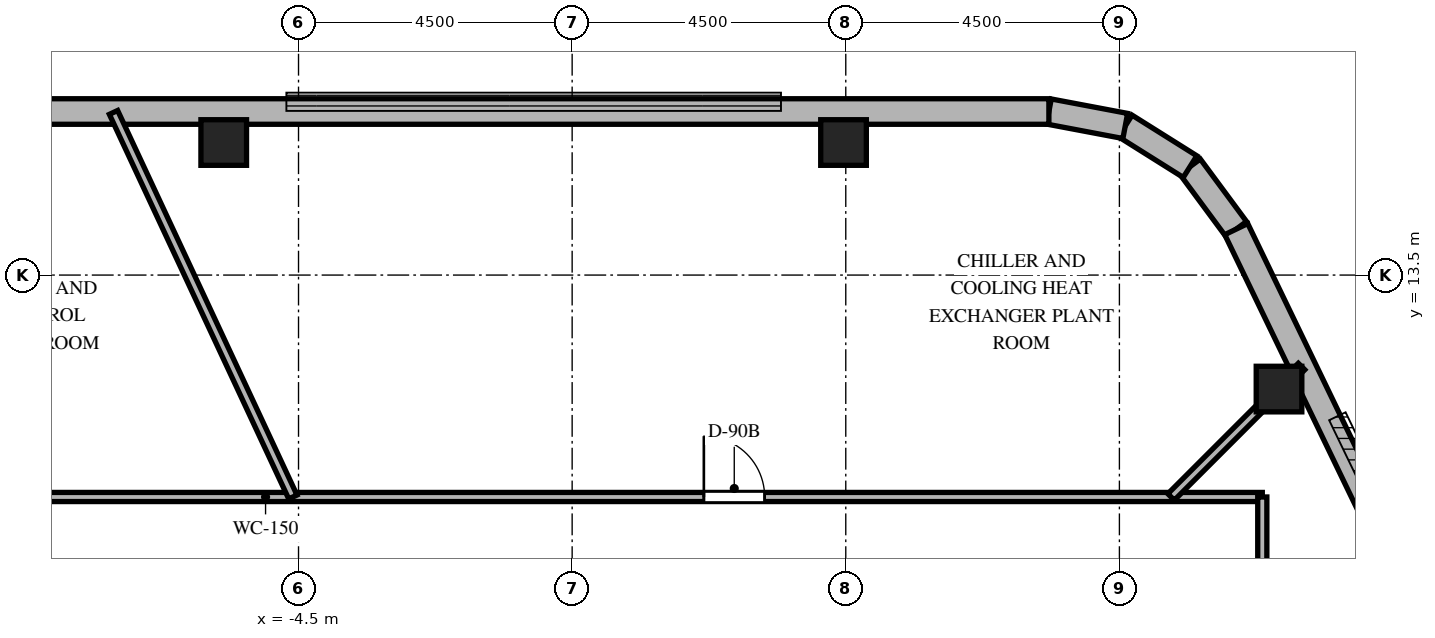
"""IFC4 building model, lengths in metres.
Left out: names, types, materials, properties, quantities, classifications, styles, units other than length and angle.
Written with IfcOpenShell. Run it as: python <this file> out.ifc"""

import sys

from ifc_helpers import new_model, si_unit, direction, frame, frame_2d, origin, origin_2d, place, context, subcontext, project, spatial, rectangle, extrude, element, fill, save


model = new_model("IFC4")
c1 = context("Model", 3, precision=1e-05, world=origin(), true_north=direction((0.0, 1.0)))
c2 = subcontext(c1, "Body", "Model", "MODEL_VIEW")
j1 = project(units=[si_unit("LENGTHUNIT", "METRE"), si_unit("PLANEANGLEUNIT", "RADIAN")], contexts=[c1])
p1 = place(None, origin())
s1 = spatial("IfcSite", under=j1, at=p1, CompositionType="ELEMENT")
p2 = place(p1, origin())
s2 = spatial("IfcBuilding", under=s1, at=p2, CompositionType="ELEMENT")
p3 = place(p2, frame((0.0, 0.0, 310.4)))
s3 = spatial("IfcBuildingStorey", under=s2, at=p3, CompositionType="ELEMENT", Elevation=310.4)
for number, where, z_axis, x_axis in (
    (1, (11.625, 11.625, 0.0), (0.0, 0.0, 1.0), (1.0, 0.0, 0.0)),
    (2, (4.463, 15.68, 0.0), (0.0, 0.0, 1.0), (1.0, 0.0, 0.0)),
    (3, (-5.73, 15.68, 0.0), (0.0, 0.0, 1.0), (1.0, 0.0, 0.0)),
):
    element("IfcColumn", number, at=place(p3, frame(where, z_axis=z_axis, x_axis=x_axis)), inside=s3, PredefinedType="COLUMN", context=c2, shape_type="SweptSolid", body=[
        extrude(rectangle(XDim=0.75, YDim=0.75, at=origin_2d()), origin(), (0.0, 0.0, 1.0), 5.5),
    ])
p4 = place(p3, frame((10.922, 14.256, 0.0), z_axis=(0.0, 0.0, 1.0), x_axis=(-0.594423284796, 0.804152322941, 0.0)))
e4 = element("IfcWall", 4, at=p4, inside=s3, PredefinedType="SOLIDWALL", context=c2, shape_type="SweptSolid", body=[
    extrude(rectangle(XDim=1.278, YDim=0.42, at=frame_2d((0.639, 0.0))), origin(), (0.0, 0.0, 1.0), 5.18),
])
p5 = place(p3, frame((10.162, 15.284, 0.0), z_axis=(0.0, 0.0, 1.0), x_axis=(-0.846993641169, 0.53160302089, 0.0)))
e5 = element("IfcWall", 5, at=p5, inside=s3, PredefinedType="SOLIDWALL", context=c2, shape_type="SweptSolid", body=[
    extrude(rectangle(XDim=1.258, YDim=0.42, at=frame_2d((0.629, 0.0))), origin(), (0.0, 0.0, 1.0), 5.18),
])
p6 = place(p3, frame((9.096, 15.952, 0.0), z_axis=(0.0, 0.0, 1.0), x_axis=(-0.982583442004, 0.185821902637, 0.0)))
e6 = element("IfcWall", 6, at=p6, inside=s3, PredefinedType="SOLIDWALL", context=c2, shape_type="SweptSolid", body=[
    extrude(rectangle(XDim=1.278, YDim=0.42, at=frame_2d((0.639, 0.0))), origin(), (0.0, 0.0, 1.0), 5.18),
])
p7 = place(p3, frame((16.763, 2.152, 0.0), z_axis=(0.0, 0.0, 1.0), x_axis=(-0.434664735238, 0.900592342817, 0.0)))
e7 = element("IfcWall", 7, at=p7, inside=s3, PredefinedType="SOLIDWALL", context=c2, shape_type="SweptSolid", body=[
    extrude(rectangle(XDim=13.44, YDim=0.42, at=frame_2d((6.72, 0.0))), origin(), (0.0, 0.0, 1.0), 5.18),
])
p8 = place(p3, frame((7.84, 16.19, 0.0), z_axis=(0.0, 0.0, 1.0), x_axis=(-1.0, 0.0, 0.0)))
e8 = element("IfcWall", 8, at=p8, inside=s3, PredefinedType="SOLIDWALL", context=c2, shape_type="SweptSolid", body=[
    extrude(rectangle(XDim=16.946, YDim=0.42, at=frame_2d((8.473, 0.0))), origin(), (0.0, 0.0, 1.0), 5.18),
])
p9 = place(p3, frame((-11.35, 9.85, 0.0), z_axis=(0.0, 0.0, 1.0), x_axis=(1.0, 0.0, 0.0)))
e9 = element("IfcWall", 9, at=p9, inside=s3, PredefinedType="PARTITIONING", context=c2, shape_type="SweptSolid", body=[
    extrude(rectangle(XDim=22.7, YDim=0.15, at=frame_2d((11.35, 0.0))), origin(), (0.0, 0.0, 1.0), 4.67),
])
p10 = place(p9, frame((13.516, 0.0, 0.0)))
e10 = element("IfcOpeningElement", 10, at=p10, cuts=e9, PredefinedType="OPENING", context=c2, shape_type="SweptSolid", body=[
    extrude(rectangle(XDim=1.0, YDim=2.15, at=frame_2d((0.5, 1.075))), frame((0.0, 0.085, 0.0), z_axis=(0.0, -1.0, 0.0), x_axis=(1.0, 0.0, 0.0)), (0.0, 0.0, 1.0), 0.17),
])
p11 = place(p3, frame((11.35, 9.85, 0.0), z_axis=(0.0, 0.0, 1.0), x_axis=(0.0, -1.0, 0.0)))
e11 = element("IfcWall", 11, at=p11, inside=s3, PredefinedType="PARTITIONING", context=c2, shape_type="SweptSolid", body=[
    extrude(rectangle(XDim=19.7, YDim=0.15, at=frame_2d((9.85, 0.0))), origin(), (0.0, 0.0, 1.0), 4.67),
])
p12 = place(p11, frame((18.129, 0.0, 0.0)))
e12 = element("IfcOpeningElement", 12, at=p12, cuts=e11, PredefinedType="OPENING", context=c2, shape_type="SweptSolid", body=[
    extrude(rectangle(XDim=1.0, YDim=2.15, at=frame_2d((0.5, 1.075))), frame((0.0, 0.085, 0.0), z_axis=(0.0, -1.0, 0.0), x_axis=(1.0, 0.0, 0.0)), (0.0, 0.0, 1.0), 0.17),
])
p13 = place(p11, frame((8.545, 0.0, 0.0)))
e13 = element("IfcOpeningElement", 13, at=p13, cuts=e11, PredefinedType="OPENING", context=c2, shape_type="SweptSolid", body=[
    extrude(rectangle(XDim=1.0, YDim=2.15, at=frame_2d((0.5, 1.075))), frame((0.0, 0.085, 0.0), z_axis=(0.0, -1.0, 0.0), x_axis=(1.0, 0.0, 0.0)), (0.0, 0.0, 1.0), 0.17),
])
p14 = place(p3, frame((9.85, 9.85, 0.0), z_axis=(0.0, 0.0, 1.0), x_axis=(0.707106781187, 0.707106781187, 0.0)))
e14 = element("IfcWall", 14, at=p14, inside=s3, PredefinedType="PARTITIONING", context=c2, shape_type="SweptSolid", body=[
    extrude(rectangle(XDim=3.035, YDim=0.15, at=frame_2d((1.517, 0.0))), origin(), (0.0, 0.0, 1.0), 4.52),
])
p15 = place(p3, frame((-4.593, 9.85, 0.0), z_axis=(0.0, 0.0, 1.0), x_axis=(-0.422628821743, 0.906302862752, 0.0)))
e15 = element("IfcWall", 15, at=p15, inside=s3, PredefinedType="PARTITIONING", context=c2, shape_type="SweptSolid", body=[
    extrude(rectangle(XDim=6.979, YDim=0.15, at=frame_2d((3.489, 0.0))), origin(), (0.0, 0.0, 1.0), 4.52),
])
p16 = place(p10, origin())
e16 = element("IfcDoor", 16, at=p16, inside=s3, OperationType="SINGLE_SWING_LEFT", PredefinedType="DOOR", context=c2, shape_type="SweptSolid", body=[
    extrude(rectangle(XDim=1.0, YDim=2.15, at=frame_2d((0.5, 1.075))), frame((0.0, 0.025, 0.0), z_axis=(0.0, -1.0, 0.0), x_axis=(1.0, 0.0, 0.0)), (0.0, 0.0, 1.0), 0.05),
])
fill(e10, e16)
save(model, sys.argv[1])
